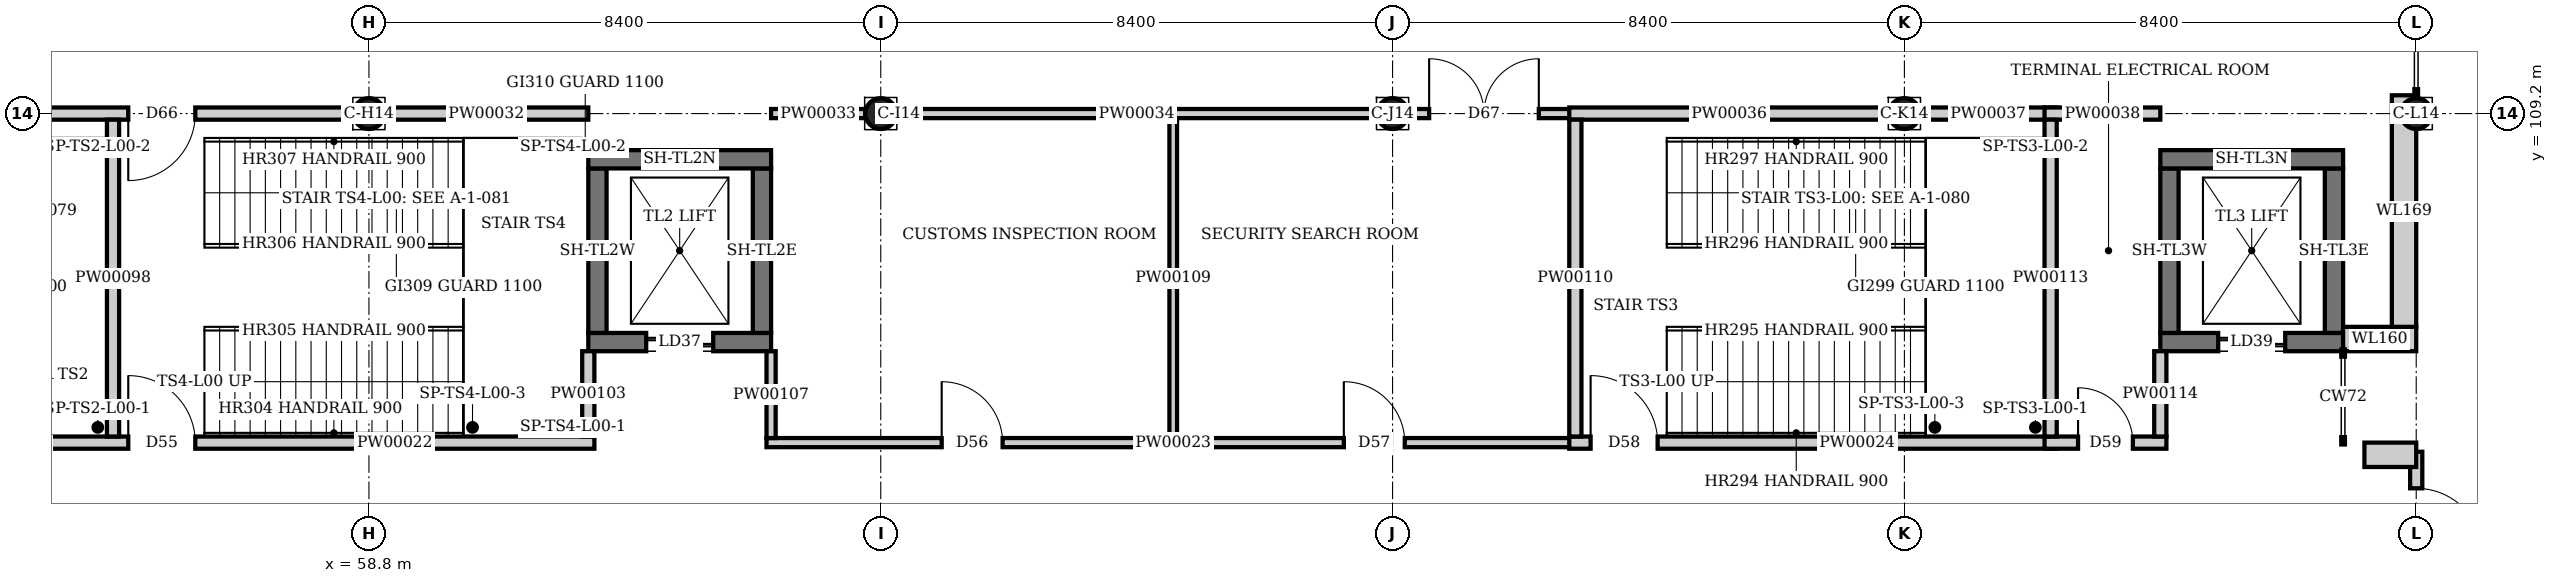
"""IFC4 building model, lengths in metres.
Left out: names, types, materials, properties, quantities, classifications, styles, units other than length and angle.
Written with IfcOpenShell. Run it as: python <this file> out.ifc"""

import sys

from ifc_helpers import new_model, si_unit, direction, frame, frame_2d, origin, origin_2d, place, context, subcontext, project, spatial, rectangle, hollow_circle, extrude, element, fill, save


model = new_model("IFC4")
c1 = context("Model", 3, precision=1e-05, world=origin(), true_north=direction((0.0, 1.0)))
c2 = subcontext(c1, "Body", "Model", "MODEL_VIEW")
j1 = project(units=[si_unit("LENGTHUNIT", "METRE"), si_unit("PLANEANGLEUNIT", "RADIAN")], contexts=[c1])
p1 = place(None, origin())
s1 = spatial("IfcSite", under=j1, at=p1, CompositionType="ELEMENT")
p2 = place(p1, origin())
s2 = spatial("IfcBuilding", under=s1, at=p2, CompositionType="ELEMENT")
p3 = place(p2, origin())
s3 = spatial("IfcBuildingStorey", under=s2, at=p3, CompositionType="ELEMENT", Elevation=0.0)
for number, where, z_axis, x_axis in (
    (1, (58.8, 109.2, -0.7), (0.0, 0.0, 1.0), (1.0, 0.0, 0.0)),
    (2, (67.2, 109.2, -0.7), (0.0, 0.0, 1.0), (1.0, 0.0, 0.0)),
    (3, (75.6, 109.2, -0.7), (0.0, 0.0, 1.0), (1.0, 0.0, 0.0)),
    (4, (84.0, 109.2, -0.7), (0.0, 0.0, 1.0), (1.0, 0.0, 0.0)),
    (5, (92.4, 109.2, -0.7), (0.0, 0.0, 1.0), (1.0, 0.0, 0.0)),
):
    element("IfcColumn", number, at=place(p3, frame(where, z_axis=z_axis, x_axis=x_axis)), inside=s3, PredefinedType="COLUMN", context=c2, shape_type="SweptSolid", body=[
        extrude(hollow_circle(Radius=0.254, WallThickness=0.016, at=origin_2d()), origin(), (0.0, 0.0, 1.0), 6.7),
    ])
p4 = place(p3, frame((62.4, 105.45, -1.6), z_axis=(0.0, 0.0, 1.0), x_axis=(1.0, 0.0, 0.0)))
e6 = element("IfcWall", 6, at=p4, inside=s3, PredefinedType="SHEAR", context=c2, shape_type="SweptSolid", body=[
    extrude(rectangle(XDim=3.0, YDim=0.3, at=frame_2d((1.5, 0.0))), origin(), (0.0, 0.0, 1.0), 7.6),
])
p5 = place(p4, frame((0.95, 0.0, 1.6)))
e7 = element("IfcOpeningElement", 7, at=p5, cuts=e6, PredefinedType="OPENING", context=c2, shape_type="SweptSolid", body=[
    extrude(rectangle(XDim=1.1, YDim=2.1, at=frame_2d((0.55, 1.05))), frame((0.0, 0.16, 0.0), z_axis=(0.0, -1.0, 0.0), x_axis=(1.0, 0.0, 0.0)), (0.0, 0.0, 1.0), 0.32),
])
for number, where, z_axis, x_axis in (
    (8, (65.25, 105.6, -1.6), (0.0, 0.0, 1.0), (0.0, 1.0, 0.0)),
    (9, (62.55, 105.6, -1.6), (0.0, 0.0, 1.0), (0.0, 1.0, 0.0)),
):
    element("IfcWall", number, at=place(p3, frame(where, z_axis=z_axis, x_axis=x_axis)), inside=s3, PredefinedType="SHEAR", context=c2, shape_type="SweptSolid", body=[
        extrude(rectangle(XDim=2.7, YDim=0.3, at=frame_2d((1.35, 0.0))), origin(), (0.0, 0.0, 1.0), 7.6),
    ])
p6 = place(p3, frame((62.4, 108.45, -1.6), z_axis=(0.0, 0.0, 1.0), x_axis=(1.0, 0.0, 0.0)))
e10 = element("IfcWall", 10, at=p6, inside=s3, PredefinedType="SHEAR", context=c2, shape_type="SweptSolid", body=[
    extrude(rectangle(XDim=3.0, YDim=0.3, at=frame_2d((1.5, 0.0))), origin(), (0.0, 0.0, 1.0), 7.6),
])
p7 = place(p3, frame((88.2, 105.45, -1.6), z_axis=(0.0, 0.0, 1.0), x_axis=(1.0, 0.0, 0.0)))
e11 = element("IfcWall", 11, at=p7, inside=s3, PredefinedType="SHEAR", context=c2, shape_type="SweptSolid", body=[
    extrude(rectangle(XDim=3.0, YDim=0.3, at=frame_2d((1.5, 0.0))), origin(), (0.0, 0.0, 1.0), 7.6),
])
p8 = place(p7, frame((0.95, 0.0, 1.6)))
e12 = element("IfcOpeningElement", 12, at=p8, cuts=e11, PredefinedType="OPENING", context=c2, shape_type="SweptSolid", body=[
    extrude(rectangle(XDim=1.1, YDim=2.1, at=frame_2d((0.55, 1.05))), frame((0.0, 0.16, 0.0), z_axis=(0.0, -1.0, 0.0), x_axis=(1.0, 0.0, 0.0)), (0.0, 0.0, 1.0), 0.32),
])
for number, where, z_axis, x_axis in (
    (13, (91.05, 105.6, -1.6), (0.0, 0.0, 1.0), (0.0, 1.0, 0.0)),
    (14, (88.35, 105.6, -1.6), (0.0, 0.0, 1.0), (0.0, 1.0, 0.0)),
):
    element("IfcWall", number, at=place(p3, frame(where, z_axis=z_axis, x_axis=x_axis)), inside=s3, PredefinedType="SHEAR", context=c2, shape_type="SweptSolid", body=[
        extrude(rectangle(XDim=2.7, YDim=0.3, at=frame_2d((1.35, 0.0))), origin(), (0.0, 0.0, 1.0), 7.6),
    ])
p9 = place(p3, frame((88.2, 108.45, -1.6), z_axis=(0.0, 0.0, 1.0), x_axis=(1.0, 0.0, 0.0)))
e15 = element("IfcWall", 15, at=p9, inside=s3, PredefinedType="SHEAR", context=c2, shape_type="SweptSolid", body=[
    extrude(rectangle(XDim=3.0, YDim=0.3, at=frame_2d((1.5, 0.0))), origin(), (0.0, 0.0, 1.0), 7.6),
])
p10 = place(p3, frame((92.4, 101.35, 0.0), z_axis=(0.0, 0.0, 1.0), x_axis=(0.0, 1.0, 0.0)))
e16 = element("IfcWall", 16, at=p10, inside=s3, PredefinedType="SOLIDWALL", context=c2, shape_type="SweptSolid", body=[
    extrude(rectangle(XDim=2.3, YDim=0.2, at=frame_2d((1.15, 0.0))), origin(), (0.0, 0.0, 1.0), 5.198),
])
p11 = place(p10, frame((0.6, 0.0, 0.0)))
e17 = element("IfcOpeningElement", 17, at=p11, cuts=e16, PredefinedType="OPENING", context=c2, shape_type="SweptSolid", body=[
    extrude(rectangle(XDim=1.1, YDim=2.4, at=frame_2d((0.55, 1.2))), frame((0.0, 0.11, 0.0), z_axis=(0.0, -1.0, 0.0), x_axis=(1.0, 0.0, 0.0)), (0.0, 0.0, 1.0), 0.22),
])
p12 = place(p3, frame((91.2, 105.5, 0.0), z_axis=(0.0, 0.0, 1.0), x_axis=(1.0, 0.0, 0.0)))
e18 = element("IfcWall", 18, at=p12, inside=s3, PredefinedType="SOLIDWALL", context=c2, shape_type="SweptSolid", body=[
    extrude(rectangle(XDim=1.2, YDim=0.4, at=frame_2d((0.6, 0.0))), origin(), (0.0, 0.0, 1.0), 5.8),
])
p13 = place(p3, frame((91.55, 103.6, 0.0), z_axis=(0.0, 0.0, 1.0), x_axis=(1.0, 0.0, 0.0)))
e19 = element("IfcWall", 19, at=p13, inside=s3, PredefinedType="SOLIDWALL", context=c2, shape_type="SweptSolid", body=[
    extrude(rectangle(XDim=0.85, YDim=0.4, at=frame_2d((0.425, 0.0))), origin(), (0.0, 0.0, 1.0), 5.35),
])
p14 = place(p3, frame((92.2, 105.7, 0.0), z_axis=(0.0, 0.0, 1.0), x_axis=(0.0, 1.0, 0.0)))
e20 = element("IfcWall", 20, at=p14, inside=s3, PredefinedType="SOLIDWALL", context=c2, shape_type="SweptSolid", body=[
    extrude(rectangle(XDim=3.8, YDim=0.4, at=frame_2d((1.9, 0.0))), origin(), (0.0, 0.0, 1.0), 5.8),
])
p15 = place(p3, frame((46.7, 103.8, 0.0), z_axis=(0.0, 0.0, 1.0), x_axis=(1.0, 0.0, 0.0)))
e21 = element("IfcWall", 21, at=p15, inside=s3, PredefinedType="PARTITIONING", context=c2, shape_type="SweptSolid", body=[
    extrude(rectangle(XDim=15.8, YDim=0.2, at=frame_2d((7.9, 0.0))), origin(), (0.0, 0.0, 1.0), 5.8),
])
p16 = place(p15, frame((0.35, 0.0, 0.0)))
e22 = element("IfcOpeningElement", 22, at=p16, cuts=e21, PredefinedType="OPENING", context=c2, shape_type="SweptSolid", body=[
    extrude(rectangle(XDim=1.1, YDim=2.4, at=frame_2d((0.55, 1.2))), frame((0.0, 0.11, 0.0), z_axis=(0.0, -1.0, 0.0), x_axis=(1.0, 0.0, 0.0)), (0.0, 0.0, 1.0), 0.22),
])
p17 = place(p15, frame((8.15, 0.0, 0.0)))
e23 = element("IfcOpeningElement", 23, at=p17, cuts=e21, PredefinedType="OPENING", context=c2, shape_type="SweptSolid", body=[
    extrude(rectangle(XDim=1.1, YDim=2.4, at=frame_2d((0.55, 1.2))), frame((0.0, 0.11, 0.0), z_axis=(0.0, -1.0, 0.0), x_axis=(1.0, 0.0, 0.0)), (0.0, 0.0, 1.0), 0.22),
])
p18 = place(p3, frame((65.325, 103.8, 0.0), z_axis=(0.0, 0.0, 1.0), x_axis=(1.0, 0.0, 0.0)))
e24 = element("IfcWall", 24, at=p18, inside=s3, PredefinedType="PARTITIONING", context=c2, shape_type="SweptSolid", body=[
    extrude(rectangle(XDim=13.375, YDim=0.15, at=frame_2d((6.688, 0.0))), origin(), (0.0, 0.0, 1.0), 5.8),
])
p19 = place(p18, frame((2.875, 0.0, 0.0)))
e25 = element("IfcOpeningElement", 25, at=p19, cuts=e24, PredefinedType="OPENING", context=c2, shape_type="SweptSolid", body=[
    extrude(rectangle(XDim=1.0, YDim=2.1, at=frame_2d((0.5, 1.05))), frame((0.0, 0.085, 0.0), z_axis=(0.0, -1.0, 0.0), x_axis=(1.0, 0.0, 0.0)), (0.0, 0.0, 1.0), 0.17),
])
p20 = place(p18, frame((9.475, 0.0, 0.0)))
e26 = element("IfcOpeningElement", 26, at=p20, cuts=e24, PredefinedType="OPENING", context=c2, shape_type="SweptSolid", body=[
    extrude(rectangle(XDim=1.0, YDim=2.1, at=frame_2d((0.5, 1.05))), frame((0.0, 0.085, 0.0), z_axis=(0.0, -1.0, 0.0), x_axis=(1.0, 0.0, 0.0)), (0.0, 0.0, 1.0), 0.17),
])
p21 = place(p3, frame((78.5, 103.8, 0.0), z_axis=(0.0, 0.0, 1.0), x_axis=(1.0, 0.0, 0.0)))
e27 = element("IfcWall", 27, at=p21, inside=s3, PredefinedType="PARTITIONING", context=c2, shape_type="SweptSolid", body=[
    extrude(rectangle(XDim=8.0, YDim=0.2, at=frame_2d((4.0, 0.0))), origin(), (0.0, 0.0, 1.0), 5.8),
])
p22 = place(p21, frame((0.35, 0.0, 0.0)))
e28 = element("IfcOpeningElement", 28, at=p22, cuts=e27, PredefinedType="OPENING", context=c2, shape_type="SweptSolid", body=[
    extrude(rectangle(XDim=1.1, YDim=2.4, at=frame_2d((0.55, 1.2))), frame((0.0, 0.11, 0.0), z_axis=(0.0, -1.0, 0.0), x_axis=(1.0, 0.0, 0.0)), (0.0, 0.0, 1.0), 0.22),
])
p23 = place(p3, frame((86.3, 103.8, 0.0), z_axis=(0.0, 0.0, 1.0), x_axis=(1.0, 0.0, 0.0)))
e29 = element("IfcWall", 29, at=p23, inside=s3, PredefinedType="PARTITIONING", context=c2, shape_type="SweptSolid", body=[
    extrude(rectangle(XDim=2.0, YDim=0.2, at=frame_2d((1.0, 0.0))), origin(), (0.0, 0.0, 1.0), 5.8),
])
p24 = place(p23, frame((0.55, 0.0, 0.0)))
e30 = element("IfcOpeningElement", 30, at=p24, cuts=e29, PredefinedType="OPENING", context=c2, shape_type="SweptSolid", body=[
    extrude(rectangle(XDim=0.9, YDim=2.1, at=frame_2d((0.45, 1.05))), frame((0.0, 0.11, 0.0), z_axis=(0.0, -1.0, 0.0), x_axis=(1.0, 0.0, 0.0)), (0.0, 0.0, 1.0), 0.22),
])
p25 = place(p3, frame((50.654, 109.2, 0.0), z_axis=(0.0, 0.0, 1.0), x_axis=(1.0, 0.0, 0.0)))
e31 = element("IfcWall", 31, at=p25, inside=s3, PredefinedType="PARTITIONING", context=c2, shape_type="SweptSolid", body=[
    extrude(rectangle(XDim=7.892, YDim=0.2, at=frame_2d((3.946, 0.0))), origin(), (0.0, 0.0, 1.0), 5.346),
])
p26 = place(p25, frame((4.196, 0.0, 0.0)))
e32 = element("IfcOpeningElement", 32, at=p26, cuts=e31, PredefinedType="OPENING", context=c2, shape_type="SweptSolid", body=[
    extrude(rectangle(XDim=1.1, YDim=2.4, at=frame_2d((0.55, 1.2))), frame((0.0, 0.11, 0.0), z_axis=(0.0, -1.0, 0.0), x_axis=(1.0, 0.0, 0.0)), (0.0, 0.0, 1.0), 0.22),
])
p27 = place(p3, frame((59.054, 109.2, 0.0), z_axis=(0.0, 0.0, 1.0), x_axis=(1.0, 0.0, 0.0)))
e33 = element("IfcWall", 33, at=p27, inside=s3, PredefinedType="PARTITIONING", context=c2, shape_type="SweptSolid", body=[
    extrude(rectangle(XDim=3.346, YDim=0.2, at=frame_2d((1.673, 0.0))), origin(), (0.0, 0.0, 1.0), 5.198),
])
p28 = place(p3, frame((65.4, 109.2, 0.0), z_axis=(0.0, 0.0, 1.0), x_axis=(1.0, 0.0, 0.0)))
e34 = element("IfcWall", 34, at=p28, inside=s3, PredefinedType="PARTITIONING", context=c2, shape_type="SweptSolid", body=[
    extrude(rectangle(XDim=1.546, YDim=0.15, at=frame_2d((0.773, 0.0))), origin(), (0.0, 0.0, 1.0), 5.198),
])
p29 = place(p3, frame((67.454, 109.2, 0.0), z_axis=(0.0, 0.0, 1.0), x_axis=(1.0, 0.0, 0.0)))
e35 = element("IfcWall", 35, at=p29, inside=s3, PredefinedType="PARTITIONING", context=c2, shape_type="SweptSolid", body=[
    extrude(rectangle(XDim=7.892, YDim=0.15, at=frame_2d((3.946, 0.0))), origin(), (0.0, 0.0, 1.0), 5.198),
])
p30 = place(p3, frame((75.854, 109.2, 0.0), z_axis=(0.0, 0.0, 1.0), x_axis=(1.0, 0.0, 0.0)))
e36 = element("IfcWall", 36, at=p30, inside=s3, PredefinedType="PARTITIONING", context=c2, shape_type="SweptSolid", body=[
    extrude(rectangle(XDim=2.846, YDim=0.15, at=frame_2d((1.423, 0.0))), origin(), (0.0, 0.0, 1.0), 5.198),
])
p31 = place(p30, frame((0.346, 0.0, 0.0)))
e37 = element("IfcOpeningElement", 37, at=p31, cuts=e36, PredefinedType="OPENING", context=c2, shape_type="SweptSolid", body=[
    extrude(rectangle(XDim=1.8, YDim=2.4, at=frame_2d((0.9, 1.2))), frame((0.0, 0.085, 0.0), z_axis=(0.0, -1.0, 0.0), x_axis=(1.0, 0.0, 0.0)), (0.0, 0.0, 1.0), 0.17),
])
p32 = place(p3, frame((78.5, 109.2, 0.0), z_axis=(0.0, 0.0, 1.0), x_axis=(1.0, 0.0, 0.0)))
e38 = element("IfcWall", 38, at=p32, inside=s3, PredefinedType="PARTITIONING", context=c2, shape_type="SweptSolid", body=[
    extrude(rectangle(XDim=5.246, YDim=0.2, at=frame_2d((2.623, 0.0))), origin(), (0.0, 0.0, 1.0), 5.198),
])
p33 = place(p3, frame((84.254, 109.2, 0.0), z_axis=(0.0, 0.0, 1.0), x_axis=(1.0, 0.0, 0.0)))
e39 = element("IfcWall", 39, at=p33, inside=s3, PredefinedType="PARTITIONING", context=c2, shape_type="SweptSolid", body=[
    extrude(rectangle(XDim=2.246, YDim=0.2, at=frame_2d((1.123, 0.0))), origin(), (0.0, 0.0, 1.0), 5.198),
])
p34 = place(p3, frame((86.3, 109.2, 0.0), z_axis=(0.0, 0.0, 1.0), x_axis=(1.0, 0.0, 0.0)))
e40 = element("IfcWall", 40, at=p34, inside=s3, PredefinedType="PARTITIONING", context=c2, shape_type="SweptSolid", body=[
    extrude(rectangle(XDim=1.9, YDim=0.2, at=frame_2d((0.95, 0.0))), origin(), (0.0, 0.0, 1.0), 5.198),
])
p35 = place(p3, frame((54.6, 103.9, 0.0), z_axis=(0.0, 0.0, 1.0), x_axis=(0.0, 1.0, 0.0)))
e41 = element("IfcWall", 41, at=p35, inside=s3, PredefinedType="PARTITIONING", context=c2, shape_type="SweptSolid", body=[
    extrude(rectangle(XDim=5.2, YDim=0.2, at=frame_2d((2.6, 0.0))), origin(), (0.0, 0.0, 1.0), 5.346),
])
p36 = place(p3, frame((62.4, 103.9, 0.0), z_axis=(0.0, 0.0, 1.0), x_axis=(0.0, 1.0, 0.0)))
e42 = element("IfcWall", 42, at=p36, inside=s3, PredefinedType="PARTITIONING", context=c2, shape_type="SweptSolid", body=[
    extrude(rectangle(XDim=1.4, YDim=0.2, at=frame_2d((0.7, 0.0))), origin(), (0.0, 0.0, 1.0), 5.346),
])
p37 = place(p3, frame((65.4, 103.875, 0.0), z_axis=(0.0, 0.0, 1.0), x_axis=(0.0, 1.0, 0.0)))
e43 = element("IfcWall", 43, at=p37, inside=s3, PredefinedType="PARTITIONING", context=c2, shape_type="SweptSolid", body=[
    extrude(rectangle(XDim=1.425, YDim=0.15, at=frame_2d((0.712, 0.0))), origin(), (0.0, 0.0, 1.0), 5.8),
])
p38 = place(p3, frame((72.0, 103.875, 0.0), z_axis=(0.0, 0.0, 1.0), x_axis=(0.0, 1.0, 0.0)))
e44 = element("IfcWall", 44, at=p38, inside=s3, PredefinedType="PARTITIONING", context=c2, shape_type="SweptSolid", body=[
    extrude(rectangle(XDim=5.25, YDim=0.125, at=frame_2d((2.625, 0.0))), origin(), (0.0, 0.0, 1.0), 5.8),
])
p39 = place(p3, frame((78.6, 103.9, 0.0), z_axis=(0.0, 0.0, 1.0), x_axis=(0.0, 1.0, 0.0)))
e45 = element("IfcWall", 45, at=p39, inside=s3, PredefinedType="PARTITIONING", context=c2, shape_type="SweptSolid", body=[
    extrude(rectangle(XDim=5.2, YDim=0.2, at=frame_2d((2.6, 0.0))), origin(), (0.0, 0.0, 1.0), 5.8),
])
p40 = place(p3, frame((86.4, 103.9, 0.0), z_axis=(0.0, 0.0, 1.0), x_axis=(0.0, 1.0, 0.0)))
e46 = element("IfcWall", 46, at=p40, inside=s3, PredefinedType="PARTITIONING", context=c2, shape_type="SweptSolid", body=[
    extrude(rectangle(XDim=5.2, YDim=0.2, at=frame_2d((2.6, 0.0))), origin(), (0.0, 0.0, 1.0), 5.346),
])
p41 = place(p3, frame((88.2, 103.9, 0.0), z_axis=(0.0, 0.0, 1.0), x_axis=(0.0, 1.0, 0.0)))
e47 = element("IfcWall", 47, at=p41, inside=s3, PredefinedType="PARTITIONING", context=c2, shape_type="SweptSolid", body=[
    extrude(rectangle(XDim=1.4, YDim=0.2, at=frame_2d((0.7, 0.0))), origin(), (0.0, 0.0, 1.0), 5.8),
])
for number, where, z_axis, x_axis in (
    (48, (54.35, 104.05, 0.0), (0.0, 0.0, 1.0), (1.0, 0.0, 0.0)),
    (49, (54.35, 108.65, 0.0), (0.0, 0.0, 1.0), (1.0, 0.0, 0.0)),
    (50, (86.15, 104.05, 0.0), (0.0, 0.0, 1.0), (1.0, 0.0, 0.0)),
    (51, (86.15, 108.65, 0.0), (0.0, 0.0, 1.0), (1.0, 0.0, 0.0)),
    (52, (84.5, 104.05, 0.0), (0.0, 0.0, 1.0), (1.0, 0.0, 0.0)),
    (53, (62.15, 104.05, 0.0), (0.0, 0.0, 1.0), (1.0, 0.0, 0.0)),
    (54, (62.15, 108.65, 0.0), (0.0, 0.0, 1.0), (1.0, 0.0, 0.0)),
    (55, (60.5, 104.05, 0.0), (0.0, 0.0, 1.0), (1.0, 0.0, 0.0)),
):
    element("IfcColumn", number, at=place(p3, frame(where, z_axis=z_axis, x_axis=x_axis)), inside=s3, PredefinedType="COLUMN", context=c2, shape_type="SweptSolid", body=[
        extrude(hollow_circle(Radius=0.07, WallThickness=0.008, at=origin_2d()), origin(), (0.0, 0.0, 1.0), 2.8),
    ])
p42 = place(p11, frame((1.1, 0.0, 0.0), z_axis=(0.0, 0.0, 1.0), x_axis=(-1.0, 0.0, 0.0)))
e56 = element("IfcDoor", 56, at=p42, inside=s3, OperationType="SINGLE_SWING_RIGHT", PredefinedType="DOOR", context=c2, shape_type="SweptSolid", body=[
    extrude(rectangle(XDim=1.1, YDim=2.4, at=frame_2d((0.55, 1.2))), frame((0.0, 0.025, 0.0), z_axis=(0.0, -1.0, 0.0), x_axis=(1.0, 0.0, 0.0)), (0.0, 0.0, 1.0), 0.05),
])
fill(e17, e56)
p43 = place(p17, origin())
e57 = element("IfcDoor", 57, at=p43, inside=s3, OperationType="SINGLE_SWING_LEFT", PredefinedType="DOOR", context=c2, shape_type="SweptSolid", body=[
    extrude(rectangle(XDim=1.1, YDim=2.4, at=frame_2d((0.55, 1.2))), frame((0.0, 0.025, 0.0), z_axis=(0.0, -1.0, 0.0), x_axis=(1.0, 0.0, 0.0)), (0.0, 0.0, 1.0), 0.05),
])
fill(e23, e57)
p44 = place(p19, origin())
e58 = element("IfcDoor", 58, at=p44, inside=s3, OperationType="SINGLE_SWING_LEFT", PredefinedType="DOOR", context=c2, shape_type="SweptSolid", body=[
    extrude(rectangle(XDim=1.0, YDim=2.1, at=frame_2d((0.5, 1.05))), frame((0.0, 0.025, 0.0), z_axis=(0.0, -1.0, 0.0), x_axis=(1.0, 0.0, 0.0)), (0.0, 0.0, 1.0), 0.05),
])
fill(e25, e58)
p45 = place(p20, origin())
e59 = element("IfcDoor", 59, at=p45, inside=s3, OperationType="SINGLE_SWING_LEFT", PredefinedType="DOOR", context=c2, shape_type="SweptSolid", body=[
    extrude(rectangle(XDim=1.0, YDim=2.1, at=frame_2d((0.5, 1.05))), frame((0.0, 0.025, 0.0), z_axis=(0.0, -1.0, 0.0), x_axis=(1.0, 0.0, 0.0)), (0.0, 0.0, 1.0), 0.05),
])
fill(e26, e59)
p46 = place(p22, origin())
e60 = element("IfcDoor", 60, at=p46, inside=s3, OperationType="SINGLE_SWING_LEFT", PredefinedType="DOOR", context=c2, shape_type="SweptSolid", body=[
    extrude(rectangle(XDim=1.1, YDim=2.4, at=frame_2d((0.55, 1.2))), frame((0.0, 0.025, 0.0), z_axis=(0.0, -1.0, 0.0), x_axis=(1.0, 0.0, 0.0)), (0.0, 0.0, 1.0), 0.05),
])
fill(e28, e60)
p47 = place(p24, origin())
e61 = element("IfcDoor", 61, at=p47, inside=s3, OperationType="SINGLE_SWING_LEFT", PredefinedType="DOOR", context=c2, shape_type="SweptSolid", body=[
    extrude(rectangle(XDim=0.9, YDim=2.1, at=frame_2d((0.45, 1.05))), frame((0.0, 0.025, 0.0), z_axis=(0.0, -1.0, 0.0), x_axis=(1.0, 0.0, 0.0)), (0.0, 0.0, 1.0), 0.05),
])
fill(e30, e61)
p48 = place(p26, frame((1.1, 0.0, 0.0), z_axis=(0.0, 0.0, 1.0), x_axis=(-1.0, 0.0, 0.0)))
e62 = element("IfcDoor", 62, at=p48, inside=s3, OperationType="SINGLE_SWING_RIGHT", PredefinedType="DOOR", context=c2, shape_type="SweptSolid", body=[
    extrude(rectangle(XDim=1.1, YDim=2.4, at=frame_2d((0.55, 1.2))), frame((0.0, 0.025, 0.0), z_axis=(0.0, -1.0, 0.0), x_axis=(1.0, 0.0, 0.0)), (0.0, 0.0, 1.0), 0.05),
])
fill(e32, e62)
p49 = place(p31, origin())
e63 = element("IfcDoor", 63, at=p49, inside=s3, OperationType="DOUBLE_DOOR_SINGLE_SWING", PredefinedType="DOOR", context=c2, shape_type="SweptSolid", body=[
    extrude(rectangle(XDim=1.8, YDim=2.4, at=frame_2d((0.9, 1.2))), frame((0.0, 0.025, 0.0), z_axis=(0.0, -1.0, 0.0), x_axis=(1.0, 0.0, 0.0)), (0.0, 0.0, 1.0), 0.05),
])
fill(e37, e63)
p50 = place(p5, origin())
e64 = element("IfcDoor", 64, at=p50, inside=s3, OperationType="SLIDING_TO_LEFT", PredefinedType="DOOR", context=c2, shape_type="SweptSolid", body=[
    extrude(rectangle(XDim=1.1, YDim=2.1, at=frame_2d((0.55, 1.05))), frame((0.0, 0.025, 0.0), z_axis=(0.0, -1.0, 0.0), x_axis=(1.0, 0.0, 0.0)), (0.0, 0.0, 1.0), 0.05),
])
fill(e7, e64)
p51 = place(p8, origin())
e65 = element("IfcDoor", 65, at=p51, inside=s3, OperationType="SLIDING_TO_LEFT", PredefinedType="DOOR", context=c2, shape_type="SweptSolid", body=[
    extrude(rectangle(XDim=1.1, YDim=2.1, at=frame_2d((0.55, 1.05))), frame((0.0, 0.025, 0.0), z_axis=(0.0, -1.0, 0.0), x_axis=(1.0, 0.0, 0.0)), (0.0, 0.0, 1.0), 0.05),
])
fill(e12, e65)
save(model, sys.argv[1])
